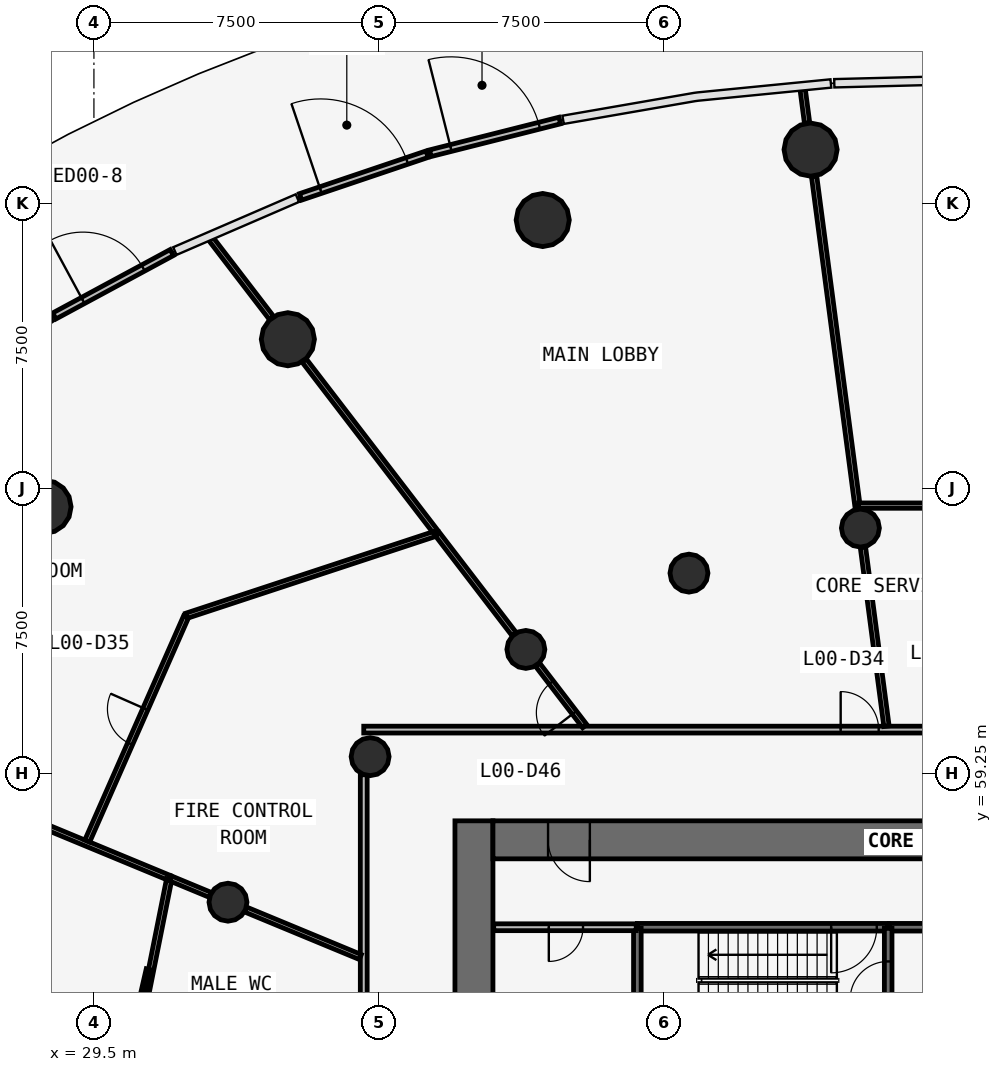
"""IFC4 building model, lengths in metres.
Left out: names, types, materials, properties, quantities, classifications, styles, units other than length and angle.
Written with IfcOpenShell. Run it as: python <this file> out.ifc"""

import sys

from ifc_helpers import new_model, si_unit, direction, frame, frame_2d, origin, origin_2d, place, context, subcontext, project, spatial, rectangle, circle, extrude, source, transform, mapped, element, fill, save


model = new_model("IFC4")
c1 = context("Model", 3, precision=1e-05, world=origin(), true_north=direction((0.0, 1.0)))
c2 = subcontext(c1, "Body", "Model", "MODEL_VIEW")
j1 = project(units=[si_unit("LENGTHUNIT", "METRE"), si_unit("PLANEANGLEUNIT", "RADIAN")], contexts=[c1])
p1 = place(None, origin())
s1 = spatial("IfcSite", under=j1, at=p1, CompositionType="ELEMENT")
p2 = place(p1, origin())
s2 = spatial("IfcBuilding", under=s1, at=p2, CompositionType="ELEMENT")
p3 = place(p2, origin())
s3 = spatial("IfcBuildingStorey", under=s2, at=p3, CompositionType="ELEMENT", Elevation=0.0)
p4 = place(p3, frame((39.5, 58.0, -0.35), z_axis=(0.0, 0.0, 1.0), x_axis=(0.0, -1.0, 0.0)))
e1 = element("IfcWall", 1, at=p4, inside=s3, PredefinedType="SHEAR", context=c2, shape_type="SweptSolid", body=[
    extrude(rectangle(XDim=20.0, YDim=1.0, at=frame_2d((10.0, 0.0))), origin(), (0.0, 0.0, 1.0), 5.35),
])
p5 = place(p4, frame((9.1, 0.0, 0.35)))
e2 = element("IfcOpeningElement", 2, at=p5, cuts=e1, PredefinedType="OPENING", context=c2, shape_type="SweptSolid", body=[
    extrude(rectangle(XDim=1.8, YDim=2.1, at=frame_2d((0.9, 1.05))), frame((0.0, 0.51, 0.0), z_axis=(0.0, -1.0, 0.0), x_axis=(1.0, 0.0, 0.0)), (0.0, 0.0, 1.0), 1.02),
])
p6 = place(p3, frame((64.0, 57.5, -0.35), z_axis=(0.0, 0.0, 1.0), x_axis=(-1.0, 0.0, 0.0)))
e3 = element("IfcWall", 3, at=p6, inside=s3, PredefinedType="SHEAR", context=c2, shape_type="SweptSolid", body=[
    extrude(rectangle(XDim=24.0, YDim=1.0, at=frame_2d((12.0, 0.0))), origin(), (0.0, 0.0, 1.0), 5.35),
])
p7 = place(p6, frame((21.45, 0.0, 0.35)))
e4 = element("IfcOpeningElement", 4, at=p7, cuts=e3, PredefinedType="OPENING", context=c2, shape_type="SweptSolid", body=[
    extrude(rectangle(XDim=1.1, YDim=2.1, at=frame_2d((0.55, 1.05))), frame((0.0, 0.51, 0.0), z_axis=(0.0, -1.0, 0.0), x_axis=(1.0, 0.0, 0.0)), (0.0, 0.0, 1.0), 1.02),
])
p8 = place(p6, frame((1.95, 0.0, 0.35)))
e5 = element("IfcOpeningElement", 5, at=p8, cuts=e3, PredefinedType="OPENING", context=c2, shape_type="SweptSolid", body=[
    extrude(rectangle(XDim=1.1, YDim=2.1, at=frame_2d((0.55, 1.05))), frame((0.0, 0.51, 0.0), z_axis=(0.0, -1.0, 0.0), x_axis=(1.0, 0.0, 0.0)), (0.0, 0.0, 1.0), 1.02),
])
m1 = source(origin(), c2, "Body", "SweptSolid", [
    extrude(circle(Radius=0.7, at=origin_2d()), origin(), (0.0, 0.0, 1.0), 5.35),
])
for number, where, z_axis, x_axis in (
    (6, (48.358, 75.661, -0.35), (0.0, 0.0, 1.0), (1.0, 0.0, 0.0)),
    (7, (41.31, 73.809, -0.35), (0.0, 0.0, 1.0), (1.0, 0.0, 0.0)),
    (8, (34.604, 70.672, -0.35), (0.0, 0.0, 1.0), (1.0, 0.0, 0.0)),
    (9, (28.199, 66.263, -0.35), (0.0, 0.0, 1.0), (1.0, 0.0, 0.0)),
):
    element("IfcColumn", number, at=place(p3, frame(where, z_axis=z_axis, x_axis=x_axis)), inside=s3, PredefinedType="COLUMN", context=c2, shape_type="MappedRepresentation", body=[
        mapped(m1, transform((0.0, 0.0, 0.0), scale=1.0)),
    ])
m2 = source(origin(), c2, "Body", "SweptSolid", [
    extrude(circle(Radius=0.5, at=origin_2d()), origin(), (0.0, 0.0, 1.0), 5.35),
])
for number, where, z_axis, x_axis in (
    (10, (49.669, 65.703, -0.35), (0.0, 0.0, 1.0), (1.0, 0.0, 0.0)),
    (11, (45.158, 64.518, -0.35), (0.0, 0.0, 1.0), (1.0, 0.0, 0.0)),
    (12, (40.866, 62.51, -0.35), (0.0, 0.0, 1.0), (1.0, 0.0, 0.0)),
    (13, (36.768, 59.688, -0.35), (0.0, 0.0, 1.0), (1.0, 0.0, 0.0)),
    (14, (33.028, 55.859, -0.35), (0.0, 0.0, 1.0), (1.0, 0.0, 0.0)),
):
    element("IfcColumn", number, at=place(p3, frame(where, z_axis=z_axis, x_axis=x_axis)), inside=s3, PredefinedType="COLUMN", context=c2, shape_type="MappedRepresentation", body=[
        mapped(m2, transform((0.0, 0.0, 0.0), scale=1.0)),
    ])
p9 = place(p3, frame((38.352, 75.566, 0.0), z_axis=(0.0, 0.0, 1.0), x_axis=(0.969559170981, 0.244857129704, 0.0)))
e15 = element("IfcWall", 15, at=p9, inside=s3, PredefinedType="STANDARD", context=c2, shape_type="SweptSolid", body=[
    extrude(rectangle(XDim=3.513, YDim=0.18, at=frame_2d((1.756, 0.0))), origin(), (0.0, 0.0, 1.0), 4.65),
])
p10 = place(p9, frame((0.556, 0.0, 0.0)))
e16 = element("IfcOpeningElement", 16, at=p10, cuts=e15, PredefinedType="OPENING", context=c2, shape_type="SweptSolid", body=[
    extrude(rectangle(XDim=2.4, YDim=2.5, at=frame_2d((1.2, 1.25))), frame((0.0, 0.1, 0.0), z_axis=(0.0, -1.0, 0.0), x_axis=(1.0, 0.0, 0.0)), (0.0, 0.0, 1.0), 0.2),
])
p11 = place(p3, frame((34.938, 74.417, 0.0), z_axis=(0.0, 0.0, 1.0), x_axis=(0.947474115606, 0.319832456541, 0.0)))
e17 = element("IfcWall", 17, at=p11, inside=s3, PredefinedType="STANDARD", context=c2, shape_type="SweptSolid", body=[
    extrude(rectangle(XDim=3.513, YDim=0.18, at=frame_2d((1.756, 0.0))), origin(), (0.0, 0.0, 1.0), 4.65),
])
p12 = place(p11, frame((0.556, 0.0, 0.0)))
e18 = element("IfcOpeningElement", 18, at=p12, cuts=e17, PredefinedType="OPENING", context=c2, shape_type="SweptSolid", body=[
    extrude(rectangle(XDim=2.4, YDim=2.5, at=frame_2d((1.2, 1.25))), frame((0.0, 0.1, 0.0), z_axis=(0.0, -1.0, 0.0), x_axis=(1.0, 0.0, 0.0)), (0.0, 0.0, 1.0), 0.2),
])
p13 = place(p3, frame((28.458, 71.284, 0.0), z_axis=(0.0, 0.0, 1.0), x_axis=(0.880004187443, 0.474965925181, 0.0)))
e19 = element("IfcWall", 19, at=p13, inside=s3, PredefinedType="STANDARD", context=c2, shape_type="SweptSolid", body=[
    extrude(rectangle(XDim=3.512, YDim=0.18, at=frame_2d((1.756, 0.0))), origin(), (0.0, 0.0, 1.0), 4.65),
])
p14 = place(p13, frame((0.856, 0.0, 0.0)))
e20 = element("IfcOpeningElement", 20, at=p14, cuts=e19, PredefinedType="OPENING", context=c2, shape_type="SweptSolid", body=[
    extrude(rectangle(XDim=1.8, YDim=2.2, at=frame_2d((0.9, 1.1))), frame((0.0, 0.1, 0.0), z_axis=(0.0, -1.0, 0.0), x_axis=(1.0, 0.0, 0.0)), (0.0, 0.0, 1.0), 0.2),
])
p15 = place(p3, frame((50.4, 55.2, 0.0), z_axis=(0.0, 0.0, 1.0), x_axis=(-1.0, 0.0, 0.0)))
e21 = element("IfcWall", 21, at=p15, inside=s3, PredefinedType="SOLIDWALL", context=c2, shape_type="SweptSolid", body=[
    extrude(rectangle(XDim=6.6, YDim=0.2, at=frame_2d((3.3, 0.0))), origin(), (0.0, 0.0, 1.0), 4.65),
])
p16 = place(p15, frame((0.3, 0.0, 0.0)))
e22 = element("IfcOpeningElement", 22, at=p16, cuts=e21, PredefinedType="OPENING", context=c2, shape_type="SweptSolid", body=[
    extrude(rectangle(XDim=1.2, YDim=2.1, at=frame_2d((0.6, 1.05))), frame((0.0, 0.11, 0.0), z_axis=(0.0, -1.0, 0.0), x_axis=(1.0, 0.0, 0.0)), (0.0, 0.0, 1.0), 0.22),
])
p17 = place(p3, frame((56.1, 55.2, 0.0), z_axis=(0.0, 0.0, 1.0), x_axis=(-1.0, 0.0, 0.0)))
e23 = element("IfcWall", 23, at=p17, inside=s3, PredefinedType="SOLIDWALL", context=c2, shape_type="SweptSolid", body=[
    extrude(rectangle(XDim=5.67, YDim=0.2, at=frame_2d((2.835, 0.0))), origin(), (0.0, 0.0, 1.0), 4.65),
])
p18 = place(p17, frame((2.95, 0.0, 0.0)))
e24 = element("IfcOpeningElement", 24, at=p18, cuts=e23, PredefinedType="OPENING", context=c2, shape_type="SweptSolid", body=[
    extrude(rectangle(XDim=1.1, YDim=2.1, at=frame_2d((0.55, 1.05))), frame((0.0, 0.11, 0.0), z_axis=(0.0, -1.0, 0.0), x_axis=(1.0, 0.0, 0.0)), (0.0, 0.0, 1.0), 0.22),
])
p19 = place(p3, frame((50.4, 52.4, 0.0), z_axis=(0.0, 0.0, 1.0), x_axis=(0.0, 1.0, 0.0)))
e25 = element("IfcWall", 25, at=p19, inside=s3, PredefinedType="SOLIDWALL", context=c2, shape_type="SweptSolid", body=[
    extrude(rectangle(XDim=2.77, YDim=0.2, at=frame_2d((1.385, 0.0))), origin(), (0.0, 0.0, 1.0), 4.65),
])
p20 = place(p19, frame((0.9, 0.0, 0.0)))
e26 = element("IfcOpeningElement", 26, at=p20, cuts=e25, PredefinedType="OPENING", context=c2, shape_type="SweptSolid", body=[
    extrude(rectangle(XDim=1.0, YDim=2.1, at=frame_2d((0.5, 1.05))), frame((0.0, 0.11, 0.0), z_axis=(0.0, -1.0, 0.0), x_axis=(1.0, 0.0, 0.0)), (0.0, 0.0, 1.0), 0.22),
])
p21 = place(p3, frame((43.8, 55.17, 0.0), z_axis=(0.0, 0.0, 1.0), x_axis=(0.0, -1.0, 0.0)))
e27 = element("IfcWall", 27, at=p21, inside=s3, PredefinedType="SOLIDWALL", context=c2, shape_type="SweptSolid", body=[
    extrude(rectangle(XDim=2.14, YDim=0.2, at=frame_2d((1.07, 0.0))), origin(), (0.0, 0.0, 1.0), 4.65),
])
p22 = place(p3, frame((36.6, 60.4, 0.0), z_axis=(0.0, 0.0, 1.0), x_axis=(1.0, 0.0, 0.0)))
e28 = element("IfcWall", 28, at=p22, inside=s3, PredefinedType="PARTITIONING", context=c2, shape_type="SweptSolid", body=[
    extrude(rectangle(XDim=30.8, YDim=0.18, at=frame_2d((15.4, 0.0))), origin(), (0.0, 0.0, 1.0), 3.85),
])
p23 = place(p22, frame((14.95, 0.0, 0.0)))
e29 = element("IfcOpeningElement", 29, at=p23, cuts=e28, PredefinedType="OPENING", context=c2, shape_type="SweptSolid", body=[
    extrude(rectangle(XDim=1.0, YDim=2.1, at=frame_2d((0.5, 1.05))), frame((0.0, 0.1, 0.0), z_axis=(0.0, -1.0, 0.0), x_axis=(1.0, 0.0, 0.0)), (0.0, 0.0, 1.0), 0.2),
])
p24 = place(p22, frame((12.55, 0.0, 0.0)))
e30 = element("IfcOpeningElement", 30, at=p24, cuts=e28, PredefinedType="OPENING", context=c2, shape_type="SweptSolid", body=[
    extrude(rectangle(XDim=1.0, YDim=2.1, at=frame_2d((0.5, 1.05))), frame((0.0, 0.1, 0.0), z_axis=(0.0, -1.0, 0.0), x_axis=(1.0, 0.0, 0.0)), (0.0, 0.0, 1.0), 0.2),
])
p25 = place(p3, frame((36.6, 35.63, 0.0), z_axis=(0.0, 0.0, 1.0), x_axis=(0.0, 1.0, 0.0)))
e31 = element("IfcWall", 31, at=p25, inside=s3, PredefinedType="PARTITIONING", context=c2, shape_type="SweptSolid", body=[
    extrude(rectangle(XDim=23.583, YDim=0.18, at=frame_2d((11.791, 0.0))), origin(), (0.0, 0.0, 1.0), 3.85),
])
p26 = place(p25, frame((16.032, 0.0, 0.0)))
e32 = element("IfcOpeningElement", 32, at=p26, cuts=e31, PredefinedType="OPENING", context=c2, shape_type="SweptSolid", body=[
    extrude(rectangle(XDim=0.9, YDim=2.1, at=frame_2d((0.45, 1.05))), frame((0.0, 0.1, 0.0), z_axis=(0.0, -1.0, 0.0), x_axis=(1.0, 0.0, 0.0)), (0.0, 0.0, 1.0), 0.2),
])
p27 = place(p25, frame((13.232, 0.0, 0.0)))
e33 = element("IfcOpeningElement", 33, at=p27, cuts=e31, PredefinedType="OPENING", context=c2, shape_type="SweptSolid", body=[
    extrude(rectangle(XDim=0.9, YDim=2.1, at=frame_2d((0.45, 1.05))), frame((0.0, 0.1, 0.0), z_axis=(0.0, -1.0, 0.0), x_axis=(1.0, 0.0, 0.0)), (0.0, 0.0, 1.0), 0.2),
])
p28 = place(p25, frame((11.433, 0.0, 0.0)))
e34 = element("IfcOpeningElement", 34, at=p28, cuts=e31, PredefinedType="OPENING", context=c2, shape_type="SweptSolid", body=[
    extrude(rectangle(XDim=0.9, YDim=2.1, at=frame_2d((0.45, 1.05))), frame((0.0, 0.1, 0.0), z_axis=(0.0, -1.0, 0.0), x_axis=(1.0, 0.0, 0.0)), (0.0, 0.0, 1.0), 0.2),
])
p29 = place(p25, frame((9.133, 0.0, 0.0)))
e35 = element("IfcOpeningElement", 35, at=p29, cuts=e31, PredefinedType="OPENING", context=c2, shape_type="SweptSolid", body=[
    extrude(rectangle(XDim=1.0, YDim=2.1, at=frame_2d((0.5, 1.05))), frame((0.0, 0.1, 0.0), z_axis=(0.0, -1.0, 0.0), x_axis=(1.0, 0.0, 0.0)), (0.0, 0.0, 1.0), 0.2),
])
p30 = place(p3, frame((43.77, 55.2, 0.0), z_axis=(0.0, 0.0, 1.0), x_axis=(-1.0, 0.0, 0.0)))
e36 = element("IfcWall", 36, at=p30, inside=s3, PredefinedType="PARTITIONING", context=c2, shape_type="SweptSolid", body=[
    extrude(rectangle(XDim=3.75, YDim=0.18, at=frame_2d((1.875, 0.0))), origin(), (0.0, 0.0, 1.0), 4.65),
])
p31 = place(p30, frame((1.4, 0.0, 0.0)))
e37 = element("IfcOpeningElement", 37, at=p31, cuts=e36, PredefinedType="OPENING", context=c2, shape_type="SweptSolid", body=[
    extrude(rectangle(XDim=0.9, YDim=2.1, at=frame_2d((0.45, 1.05))), frame((0.0, 0.1, 0.0), z_axis=(0.0, -1.0, 0.0), x_axis=(1.0, 0.0, 0.0)), (0.0, 0.0, 1.0), 0.2),
])
p32 = place(p3, frame((23.007, 60.01, 0.0), z_axis=(0.0, 0.0, 1.0), x_axis=(0.923871278923, -0.382703357682, 0.0)))
e38 = element("IfcWall", 38, at=p32, inside=s3, PredefinedType="PARTITIONING", context=c2, shape_type="SweptSolid", body=[
    extrude(rectangle(XDim=9.179, YDim=0.14, at=frame_2d((4.59, 0.0))), origin(), (0.0, 0.0, 1.0), 3.85),
])
p33 = place(p3, frame((49.592, 66.294, 0.0), z_axis=(0.0, 0.0, 1.0), x_axis=(-0.130530349162, 0.991444314093, 0.0)))
e39 = element("IfcWall", 39, at=p33, inside=s3, PredefinedType="PARTITIONING", context=c2, shape_type="SweptSolid", body=[
    extrude(rectangle(XDim=8.744, YDim=0.14, at=frame_2d((4.372, 0.0))), origin(), (0.0, 0.0, 1.0), 3.85),
])
p34 = place(p3, frame((38.521, 65.566, 0.0), z_axis=(0.0, 0.0, 1.0), x_axis=(-0.949758707301, -0.31298306329, 0.0)))
e40 = element("IfcWall", 40, at=p34, inside=s3, PredefinedType="PARTITIONING", context=c2, shape_type="SweptSolid", body=[
    extrude(rectangle(XDim=6.934, YDim=0.14, at=frame_2d((3.467, 0.0))), origin(), (0.0, 0.0, 1.0), 3.85),
])
p35 = place(p3, frame((29.324, 57.469, 0.0), z_axis=(0.0, 0.0, 1.0), x_axis=(0.403258856744, 0.915085949219, 0.0)))
e41 = element("IfcWall", 41, at=p35, inside=s3, PredefinedType="PARTITIONING", context=c2, shape_type="SweptSolid", body=[
    extrude(rectangle(XDim=6.447, YDim=0.14, at=frame_2d((3.224, 0.0))), origin(), (0.0, 0.0, 1.0), 3.85),
])
p36 = place(p35, frame((2.797, 0.0, 0.0)))
e42 = element("IfcOpeningElement", 42, at=p36, cuts=e41, PredefinedType="OPENING", context=c2, shape_type="SweptSolid", body=[
    extrude(rectangle(XDim=1.0, YDim=2.1, at=frame_2d((0.5, 1.05))), frame((0.0, 0.08, 0.0), z_axis=(0.0, -1.0, 0.0), x_axis=(1.0, 0.0, 0.0)), (0.0, 0.0, 1.0), 0.16),
])
p37 = place(p3, frame((38.476, 65.625, 0.0), z_axis=(0.0, 0.0, 1.0), x_axis=(-0.608780259513, 0.793338890782, 0.0)))
e43 = element("IfcWall", 43, at=p37, inside=s3, PredefinedType="PARTITIONING", context=c2, shape_type="SweptSolid", body=[
    extrude(rectangle(XDim=5.658, YDim=0.14, at=frame_2d((2.829, 0.0))), origin(), (0.0, 0.0, 1.0), 3.85),
])
p38 = place(p3, frame((31.481, 56.467, 0.0), z_axis=(0.0, 0.0, 1.0), x_axis=(-0.195841094628, -0.98063564368, 0.0)))
e44 = element("IfcWall", 44, at=p38, inside=s3, PredefinedType="PARTITIONING", context=c2, shape_type="SweptSolid", body=[
    extrude(rectangle(XDim=5.292, YDim=0.14, at=frame_2d((2.646, 0.0))), origin(), (0.0, 0.0, 1.0), 3.85),
])
p39 = place(p3, frame((50.356, 60.49, 0.0), z_axis=(0.0, 0.0, 1.0), x_axis=(-0.130548834981, 0.991441880135, 0.0)))
e45 = element("IfcWall", 45, at=p39, inside=s3, PredefinedType="PARTITIONING", context=c2, shape_type="SweptSolid", body=[
    extrude(rectangle(XDim=4.754, YDim=0.14, at=frame_2d((2.377, 0.0))), origin(), (0.0, 0.0, 1.0), 3.85),
])
p40 = place(p3, frame((54.378, 66.294, 0.0), z_axis=(0.0, 0.0, 1.0), x_axis=(-1.0, 0.0, 0.0)))
e46 = element("IfcWall", 46, at=p40, inside=s3, PredefinedType="PARTITIONING", context=c2, shape_type="SweptSolid", body=[
    extrude(rectangle(XDim=4.757, YDim=0.14, at=frame_2d((2.378, 0.0))), origin(), (0.0, 0.0, 1.0), 3.85),
])
p41 = place(p3, frame((32.561, 56.052, 0.0), z_axis=(0.0, 0.0, 1.0), x_axis=(-0.923916959191, 0.382593063867, 0.0)))
e47 = element("IfcWall", 47, at=p41, inside=s3, PredefinedType="PARTITIONING", context=c2, shape_type="SweptSolid", body=[
    extrude(rectangle(XDim=1.132, YDim=0.14, at=frame_2d((0.566, 0.0))), origin(), (0.0, 0.0, 1.0), 3.85),
])
p42 = place(p3, frame((36.51, 54.416, 0.0), z_axis=(0.0, 0.0, 1.0), x_axis=(-0.923911109142, 0.382607190737, 0.0)))
e48 = element("IfcWall", 48, at=p42, inside=s3, PredefinedType="PARTITIONING", context=c2, shape_type="SweptSolid", body=[
    extrude(rectangle(XDim=3.264, YDim=0.14, at=frame_2d((1.632, 0.0))), origin(), (0.0, 0.0, 1.0), 3.85),
])
p43 = place(p3, frame((40.559, 62.91, 0.0), z_axis=(0.0, 0.0, 1.0), x_axis=(-0.608771391178, 0.79334569595, 0.0)))
e49 = element("IfcWall", 49, at=p43, inside=s3, PredefinedType="PARTITIONING", context=c2, shape_type="SweptSolid", body=[
    extrude(rectangle(XDim=3.317, YDim=0.14, at=frame_2d((1.659, 0.0))), origin(), (0.0, 0.0, 1.0), 3.85),
])
p44 = place(p3, frame((34.175, 71.23, 0.0), z_axis=(0.0, 0.0, 1.0), x_axis=(-0.608811983243, 0.793314546104, 0.0)))
e50 = element("IfcWall", 50, at=p44, inside=s3, PredefinedType="PARTITIONING", context=c2, shape_type="SweptSolid", body=[
    extrude(rectangle(XDim=2.627, YDim=0.14, at=frame_2d((1.313, 0.0))), origin(), (0.0, 0.0, 1.0), 3.85),
])
p45 = place(p3, frame((42.416, 60.49, 0.0), z_axis=(0.0, 0.0, 1.0), x_axis=(-0.608727763541, 0.793379171578, 0.0)))
e51 = element("IfcWall", 51, at=p45, inside=s3, PredefinedType="PARTITIONING", context=c2, shape_type="SweptSolid", body=[
    extrude(rectangle(XDim=2.042, YDim=0.14, at=frame_2d((1.021, 0.0))), origin(), (0.0, 0.0, 1.0), 3.85),
])
p46 = place(p45, frame((0.45, 0.0, 0.0)))
e52 = element("IfcOpeningElement", 52, at=p46, cuts=e51, PredefinedType="OPENING", context=c2, shape_type="SweptSolid", body=[
    extrude(rectangle(XDim=1.0, YDim=2.1, at=frame_2d((0.5, 1.05))), frame((0.0, 0.08, 0.0), z_axis=(0.0, -1.0, 0.0), x_axis=(1.0, 0.0, 0.0)), (0.0, 0.0, 1.0), 0.16),
])
p47 = place(p3, frame((48.266, 76.36, 0.0), z_axis=(0.0, 0.0, 1.0), x_axis=(-0.13059675412, 0.991435569169, 0.0)))
e53 = element("IfcWall", 53, at=p47, inside=s3, PredefinedType="PARTITIONING", context=c2, shape_type="SweptSolid", body=[
    extrude(rectangle(XDim=0.888, YDim=0.14, at=frame_2d((0.444, 0.0))), origin(), (0.0, 0.0, 1.0), 3.85),
])
p48 = place(p3, frame((30.936, 54.094, 0.0), z_axis=(0.0, 0.0, 1.0), x_axis=(-0.223615873723, -0.974677352265, 0.0)))
e54 = element("IfcWall", 54, at=p48, inside=s3, PredefinedType="PARTITIONING", context=c2, shape_type="SweptSolid", body=[
    extrude(rectangle(XDim=1.391, YDim=0.12, at=frame_2d((0.695, 0.0))), origin(), (0.0, 0.0, 1.0), 3.85),
])
m3 = source(origin(), c2, "Body", "SweptSolid", [
    extrude(rectangle(XDim=2.4, YDim=2.5, at=frame_2d((1.2, 1.25))), frame((0.0, 0.025, 0.0), z_axis=(0.0, -1.0, 0.0), x_axis=(1.0, 0.0, 0.0)), (0.0, 0.0, 1.0), 0.05),
])
p49 = place(p10, origin())
e55 = element("IfcDoor", 55, at=p49, inside=s3, OperationType="DOUBLE_DOOR_SINGLE_SWING", PredefinedType="DOOR", context=c2, shape_type="MappedRepresentation", body=[
    mapped(m3, transform((0.0, 0.0, 0.0), scale=1.0)),
])
fill(e16, e55)
p50 = place(p12, origin())
e56 = element("IfcDoor", 56, at=p50, inside=s3, OperationType="DOUBLE_DOOR_SINGLE_SWING", PredefinedType="DOOR", context=c2, shape_type="MappedRepresentation", body=[
    mapped(m3, transform((0.0, 0.0, 0.0), scale=1.0)),
])
fill(e18, e56)
m4 = source(origin(), c2, "Body", "SweptSolid", [
    extrude(rectangle(XDim=1.8, YDim=2.2, at=frame_2d((0.9, 1.1))), frame((0.0, 0.025, 0.0), z_axis=(0.0, -1.0, 0.0), x_axis=(1.0, 0.0, 0.0)), (0.0, 0.0, 1.0), 0.05),
])
p51 = place(p14, origin())
e57 = element("IfcDoor", 57, at=p51, inside=s3, OperationType="DOUBLE_DOOR_SINGLE_SWING", PredefinedType="DOOR", context=c2, shape_type="MappedRepresentation", body=[
    mapped(m4, transform((0.0, 0.0, 0.0), scale=1.0)),
])
fill(e20, e57)
m5 = source(origin(), c2, "Body", "SweptSolid", [
    extrude(rectangle(XDim=1.2, YDim=2.1, at=frame_2d((0.6, 1.05))), frame((0.0, 0.025, 0.0), z_axis=(0.0, -1.0, 0.0), x_axis=(1.0, 0.0, 0.0)), (0.0, 0.0, 1.0), 0.05),
])
p52 = place(p16, origin())
e58 = element("IfcDoor", 58, at=p52, inside=s3, OperationType="SINGLE_SWING_RIGHT", PredefinedType="DOOR", context=c2, shape_type="MappedRepresentation", body=[
    mapped(m5, transform((0.0, 0.0, 0.0), scale=1.0)),
])
fill(e22, e58)
m6 = source(origin(), c2, "Body", "SweptSolid", [
    extrude(rectangle(XDim=1.0, YDim=2.1, at=frame_2d((0.5, 1.05))), frame((0.0, 0.025, 0.0), z_axis=(0.0, -1.0, 0.0), x_axis=(1.0, 0.0, 0.0)), (0.0, 0.0, 1.0), 0.05),
])
p53 = place(p20, origin())
e59 = element("IfcDoor", 59, at=p53, inside=s3, OperationType="SINGLE_SWING_LEFT", PredefinedType="DOOR", context=c2, shape_type="MappedRepresentation", body=[
    mapped(m6, transform((0.0, 0.0, 0.0), scale=1.0)),
])
fill(e26, e59)
m7 = source(origin(), c2, "Body", "SweptSolid", [
    extrude(rectangle(XDim=1.1, YDim=2.1, at=frame_2d((0.55, 1.05))), frame((0.0, 0.025, 0.0), z_axis=(0.0, -1.0, 0.0), x_axis=(1.0, 0.0, 0.0)), (0.0, 0.0, 1.0), 0.05),
])
p54 = place(p7, origin())
e60 = element("IfcDoor", 60, at=p54, inside=s3, OperationType="SINGLE_SWING_LEFT", PredefinedType="DOOR", context=c2, shape_type="MappedRepresentation", body=[
    mapped(m7, transform((0.0, 0.0, 0.0), scale=1.0)),
])
fill(e4, e60)
m8 = source(origin(), c2, "Body", "SweptSolid", [
    extrude(rectangle(XDim=1.0, YDim=2.1, at=frame_2d((0.5, 1.05))), frame((0.0, 0.025, 0.0), z_axis=(0.0, -1.0, 0.0), x_axis=(1.0, 0.0, 0.0)), (0.0, 0.0, 1.0), 0.05),
])
p55 = place(p24, origin())
e61 = element("IfcDoor", 61, at=p55, inside=s3, OperationType="SINGLE_SWING_LEFT", PredefinedType="DOOR", context=c2, shape_type="MappedRepresentation", body=[
    mapped(m8, transform((0.0, 0.0, 0.0), scale=1.0)),
])
fill(e30, e61)
m9 = source(origin(), c2, "Body", "SweptSolid", [
    extrude(rectangle(XDim=1.0, YDim=2.1, at=frame_2d((0.5, 1.05))), frame((0.0, 0.025, 0.0), z_axis=(0.0, -1.0, 0.0), x_axis=(1.0, 0.0, 0.0)), (0.0, 0.0, 1.0), 0.05),
])
p56 = place(p36, origin())
e62 = element("IfcDoor", 62, at=p56, inside=s3, OperationType="SINGLE_SWING_RIGHT", PredefinedType="DOOR", context=c2, shape_type="MappedRepresentation", body=[
    mapped(m9, transform((0.0, 0.0, 0.0), scale=1.0)),
])
fill(e42, e62)
p57 = place(p46, origin())
e63 = element("IfcDoor", 63, at=p57, inside=s3, OperationType="SINGLE_SWING_LEFT", PredefinedType="DOOR", context=c2, shape_type="MappedRepresentation", body=[
    mapped(m9, transform((0.0, 0.0, 0.0), scale=1.0)),
])
fill(e52, e63)
m10 = source(origin(), c2, "Body", "SweptSolid", [
    extrude(rectangle(XDim=0.9, YDim=2.1, at=frame_2d((0.45, 1.05))), frame((0.0, 0.025, 0.0), z_axis=(0.0, -1.0, 0.0), x_axis=(1.0, 0.0, 0.0)), (0.0, 0.0, 1.0), 0.05),
])
p58 = place(p31, origin())
e64 = element("IfcDoor", 64, at=p58, inside=s3, OperationType="SINGLE_SWING_RIGHT", PredefinedType="DOOR", context=c2, shape_type="MappedRepresentation", body=[
    mapped(m10, transform((0.0, 0.0, 0.0), scale=1.0)),
])
fill(e37, e64)
save(model, sys.argv[1])
